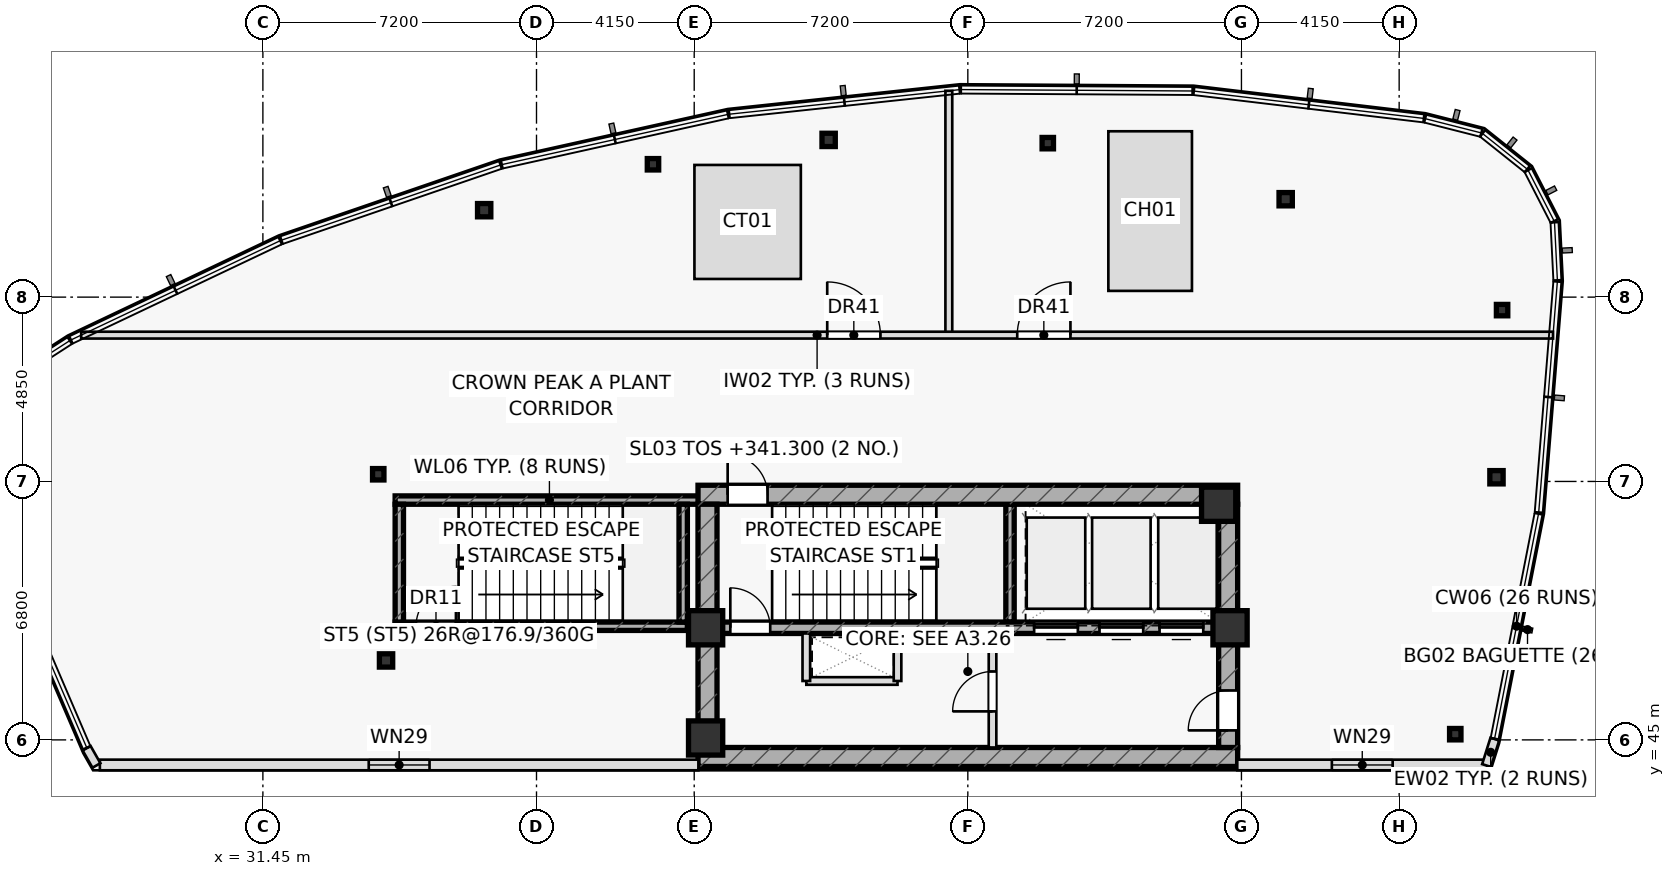
"""IFC4 building model, lengths in metres.
Left out: names, types, materials, properties, quantities, classifications, styles, units other than length and angle.
Written with IfcOpenShell. Run it as: python <this file> out.ifc"""

import sys

from ifc_helpers import new_model, si_unit, direction, frame, frame_2d, origin, origin_2d, place, context, subcontext, project, spatial, rectangle, hollow_rectangle, extrude, element, fill, save


model = new_model("IFC4")
c1 = context("Model", 3, precision=1e-05, world=origin(), true_north=direction((0.0, 1.0)))
c2 = subcontext(c1, "Body", "Model", "MODEL_VIEW")
j1 = project(units=[si_unit("LENGTHUNIT", "METRE"), si_unit("PLANEANGLEUNIT", "RADIAN")], contexts=[c1])
p1 = place(None, origin())
s1 = spatial("IfcSite", under=j1, at=p1, CompositionType="ELEMENT")
p2 = place(p1, origin())
s2 = spatial("IfcBuilding", under=s1, at=p2, CompositionType="ELEMENT")
p3 = place(p2, frame((0.0, 0.0, 341.3)))
s3 = spatial("IfcBuildingStorey", under=s2, at=p3, CompositionType="ELEMENT", Elevation=341.3)
p4 = place(p3, frame((51.11, 48.1, 0.0), z_axis=(0.0, 0.0, 1.0), x_axis=(0.0, 1.0, 0.0)))
e1 = element("IfcWall", 1, at=p4, inside=s3, PredefinedType="SHEAR", context=c2, shape_type="SweptSolid", body=[
    extrude(rectangle(XDim=3.1, YDim=0.22, at=frame_2d((1.55, 0.0))), origin(), (0.0, 0.0, 1.0), 4.25),
])
p5 = place(p3, frame((34.93, 47.99, 0.0), z_axis=(0.0, 0.0, 1.0), x_axis=(1.0, 0.0, 0.0)))
e2 = element("IfcWall", 2, at=p5, inside=s3, PredefinedType="SHEAR", context=c2, shape_type="SweptSolid", body=[
    extrude(rectangle(XDim=7.69, YDim=0.22, at=frame_2d((3.845, 0.0))), origin(), (0.0, 0.0, 1.0), 4.25),
])
p6 = place(p5, frame((0.55, 0.0, 0.0)))
e3 = element("IfcOpeningElement", 3, at=p6, cuts=e2, PredefinedType="OPENING", context=c2, shape_type="SweptSolid", body=[
    extrude(rectangle(XDim=1.05, YDim=2.2, at=frame_2d((0.525, 1.1))), frame((0.0, 0.12, 0.0), z_axis=(0.0, -1.0, 0.0), x_axis=(1.0, 0.0, 0.0)), (0.0, 0.0, 1.0), 0.24),
])
p7 = place(p3, frame((34.93, 51.31, 0.0), z_axis=(0.0, 0.0, 1.0), x_axis=(1.0, 0.0, 0.0)))
e4 = element("IfcWall", 4, at=p7, inside=s3, PredefinedType="SHEAR", context=c2, shape_type="SweptSolid", body=[
    extrude(rectangle(XDim=8.12, YDim=0.22, at=frame_2d((4.06, 0.0))), origin(), (0.0, 0.0, 1.0), 4.25),
])
for number, where, z_axis, x_axis in (
    (5, (42.51, 48.1, 0.0), (0.0, 0.0, 1.0), (0.0, 1.0, 0.0)),
    (6, (35.04, 48.1, 0.0), (0.0, 0.0, 1.0), (0.0, 1.0, 0.0)),
):
    element("IfcWall", number, at=place(p3, frame(where, z_axis=z_axis, x_axis=x_axis)), inside=s3, PredefinedType="SHEAR", context=c2, shape_type="SweptSolid", body=[
        extrude(rectangle(XDim=3.1, YDim=0.22, at=frame_2d((1.55, 0.0))), origin(), (0.0, 0.0, 1.0), 4.25),
    ])
p8 = place(p3, frame((42.9, 51.45, 0.0), z_axis=(0.0, 0.0, 1.0), x_axis=(1.0, 0.0, 0.0)))
e7 = element("IfcWall", 7, at=p8, inside=s3, PredefinedType="SHEAR", context=c2, shape_type="SweptSolid", body=[
    extrude(rectangle(XDim=14.2, YDim=0.5, at=frame_2d((7.1, 0.0))), origin(), (0.0, 0.0, 1.0), 4.25),
])
p9 = place(p8, frame((0.78, 0.0, 0.0)))
e8 = element("IfcOpeningElement", 8, at=p9, cuts=e7, PredefinedType="OPENING", context=c2, shape_type="SweptSolid", body=[
    extrude(rectangle(XDim=1.05, YDim=2.2, at=frame_2d((0.525, 1.1))), frame((0.0, 0.26, 0.0), z_axis=(0.0, -1.0, 0.0), x_axis=(1.0, 0.0, 0.0)), (0.0, 0.0, 1.0), 0.52),
])
p10 = place(p3, frame((42.9, 44.55, 0.0), z_axis=(0.0, 0.0, 1.0), x_axis=(1.0, 0.0, 0.0)))
e9 = element("IfcWall", 9, at=p10, inside=s3, PredefinedType="SHEAR", context=c2, shape_type="SweptSolid", body=[
    extrude(rectangle(XDim=14.2, YDim=0.5, at=frame_2d((7.1, 0.0))), origin(), (0.0, 0.0, 1.0), 4.25),
])
p11 = place(p3, frame((43.15, 44.8, 0.0), z_axis=(0.0, 0.0, 1.0), x_axis=(0.0, 1.0, 0.0)))
e10 = element("IfcWall", 10, at=p11, inside=s3, PredefinedType="SHEAR", context=c2, shape_type="SweptSolid", body=[
    extrude(rectangle(XDim=6.4, YDim=0.5, at=frame_2d((3.2, 0.0))), origin(), (0.0, 0.0, 1.0), 4.25),
])
p12 = place(p3, frame((56.85, 44.8, 0.0), z_axis=(0.0, 0.0, 1.0), x_axis=(0.0, 1.0, 0.0)))
e11 = element("IfcWall", 11, at=p12, inside=s3, PredefinedType="SHEAR", context=c2, shape_type="SweptSolid", body=[
    extrude(rectangle(XDim=6.4, YDim=0.5, at=frame_2d((3.2, 0.0))), origin(), (0.0, 0.0, 1.0), 4.25),
])
p13 = place(p12, frame((0.45, 0.0, 0.0)))
e12 = element("IfcOpeningElement", 12, at=p13, cuts=e11, PredefinedType="OPENING", context=c2, shape_type="SweptSolid", body=[
    extrude(rectangle(XDim=1.05, YDim=2.2, at=frame_2d((0.525, 1.1))), frame((0.0, 0.26, 0.0), z_axis=(0.0, -1.0, 0.0), x_axis=(1.0, 0.0, 0.0)), (0.0, 0.0, 1.0), 0.52),
])
p14 = place(p3, frame((43.4, 47.95, 0.0), z_axis=(0.0, 0.0, 1.0), x_axis=(1.0, 0.0, 0.0)))
e13 = element("IfcWall", 13, at=p14, inside=s3, PredefinedType="SHEAR", context=c2, shape_type="SweptSolid", body=[
    extrude(rectangle(XDim=13.2, YDim=0.3, at=frame_2d((6.6, 0.0))), origin(), (0.0, 0.0, 1.0), 4.25),
])
p15 = place(p14, frame((0.35, 0.0, 0.0)))
e14 = element("IfcOpeningElement", 14, at=p15, cuts=e13, PredefinedType="OPENING", context=c2, shape_type="SweptSolid", body=[
    extrude(rectangle(XDim=1.05, YDim=2.2, at=frame_2d((0.525, 1.1))), frame((0.0, 0.16, 0.0), z_axis=(0.0, -1.0, 0.0), x_axis=(1.0, 0.0, 0.0)), (0.0, 0.0, 1.0), 0.32),
])
p16 = place(p14, frame((8.345, 0.0, 0.0)))
e15 = element("IfcOpeningElement", 15, at=p16, cuts=e13, PredefinedType="OPENING", context=c2, shape_type="SweptSolid", body=[
    extrude(rectangle(XDim=1.15, YDim=2.2, at=frame_2d((0.575, 1.1))), frame((0.0, 0.16, 0.0), z_axis=(0.0, -1.0, 0.0), x_axis=(1.0, 0.0, 0.0)), (0.0, 0.0, 1.0), 0.32),
])
p17 = place(p14, frame((10.065, 0.0, 0.0)))
e16 = element("IfcOpeningElement", 16, at=p17, cuts=e13, PredefinedType="OPENING", context=c2, shape_type="SweptSolid", body=[
    extrude(rectangle(XDim=1.15, YDim=2.2, at=frame_2d((0.575, 1.1))), frame((0.0, 0.16, 0.0), z_axis=(0.0, -1.0, 0.0), x_axis=(1.0, 0.0, 0.0)), (0.0, 0.0, 1.0), 0.32),
])
p18 = place(p14, frame((11.645, 0.0, 0.0)))
e17 = element("IfcOpeningElement", 17, at=p18, cuts=e13, PredefinedType="OPENING", context=c2, shape_type="SweptSolid", body=[
    extrude(rectangle(XDim=1.15, YDim=2.2, at=frame_2d((0.575, 1.1))), frame((0.0, 0.16, 0.0), z_axis=(0.0, -1.0, 0.0), x_axis=(1.0, 0.0, 0.0)), (0.0, 0.0, 1.0), 0.32),
])
for number, where, z_axis, x_axis in (
    (18, (43.1, 47.95, 0.0), (0.0, 0.0, 1.0), (1.0, 0.0, 0.0)),
    (19, (56.9, 47.95, 0.0), (0.0, 0.0, 1.0), (1.0, 0.0, 0.0)),
    (20, (56.6, 51.2, 0.0), (0.0, 0.0, 1.0), (1.0, 0.0, 0.0)),
    (21, (43.1, 45.05, 0.0), (0.0, 0.0, 1.0), (1.0, 0.0, 0.0)),
):
    element("IfcColumn", number, at=place(p3, frame(where, z_axis=z_axis, x_axis=x_axis)), inside=s3, PredefinedType="COLUMN", context=c2, shape_type="SweptSolid", body=[
        extrude(rectangle(XDim=0.9, YDim=0.9, at=origin_2d()), origin(), (0.0, 0.0, 1.0), 4.25),
    ])
p19 = place(p3, frame((37.273, 58.938, 0.0), z_axis=(0.0, 0.0, 1.0), x_axis=(1.0, 0.0, 0.0)))
e22 = element("IfcColumn", 22, at=p19, inside=s3, PredefinedType="COLUMN", context=c2, shape_type="SweptSolid", body=[
    extrude(hollow_rectangle(XDim=0.35, YDim=0.35, WallThickness=0.02, at=origin_2d()), origin(), (0.0, 0.0, 1.0), 4.25),
])
p20 = place(p3, frame((34.485, 51.989, 0.0), z_axis=(0.0, 0.0, 1.0), x_axis=(1.0, 0.0, 0.0)))
e23 = element("IfcColumn", 23, at=p20, inside=s3, PredefinedType="COLUMN", context=c2, shape_type="SweptSolid", body=[
    extrude(hollow_rectangle(XDim=0.3, YDim=0.3, WallThickness=0.016, at=origin_2d()), origin(), (0.0, 0.0, 1.0), 4.25),
])
p21 = place(p3, frame((34.691, 47.09, 0.0), z_axis=(0.0, 0.0, 1.0), x_axis=(1.0, 0.0, 0.0)))
e24 = element("IfcColumn", 24, at=p21, inside=s3, PredefinedType="COLUMN", context=c2, shape_type="SweptSolid", body=[
    extrude(hollow_rectangle(XDim=0.35, YDim=0.35, WallThickness=0.02, at=origin_2d()), origin(), (0.0, 0.0, 1.0), 4.25),
])
p22 = place(p3, frame((62.826, 45.15, 0.0), z_axis=(0.0, 0.0, 1.0), x_axis=(1.0, 0.0, 0.0)))
e25 = element("IfcColumn", 25, at=p22, inside=s3, PredefinedType="COLUMN", context=c2, shape_type="SweptSolid", body=[
    extrude(hollow_rectangle(XDim=0.3, YDim=0.3, WallThickness=0.016, at=origin_2d()), origin(), (0.0, 0.0, 1.0), 4.25),
])
p23 = place(p3, frame((63.911, 51.911, 0.0), z_axis=(0.0, 0.0, 1.0), x_axis=(1.0, 0.0, 0.0)))
e26 = element("IfcColumn", 26, at=p23, inside=s3, PredefinedType="COLUMN", context=c2, shape_type="SweptSolid", body=[
    extrude(hollow_rectangle(XDim=0.35, YDim=0.35, WallThickness=0.02, at=origin_2d()), origin(), (0.0, 0.0, 1.0), 4.25),
])
p24 = place(p3, frame((64.058, 56.309, 0.0), z_axis=(0.0, 0.0, 1.0), x_axis=(1.0, 0.0, 0.0)))
e27 = element("IfcColumn", 27, at=p24, inside=s3, PredefinedType="COLUMN", context=c2, shape_type="SweptSolid", body=[
    extrude(hollow_rectangle(XDim=0.3, YDim=0.3, WallThickness=0.016, at=origin_2d()), origin(), (0.0, 0.0, 1.0), 4.25),
])
p25 = place(p3, frame((58.364, 59.226, 0.0), z_axis=(0.0, 0.0, 1.0), x_axis=(1.0, 0.0, 0.0)))
e28 = element("IfcColumn", 28, at=p25, inside=s3, PredefinedType="COLUMN", context=c2, shape_type="SweptSolid", body=[
    extrude(hollow_rectangle(XDim=0.35, YDim=0.35, WallThickness=0.02, at=origin_2d()), origin(), (0.0, 0.0, 1.0), 4.25),
])
p26 = place(p3, frame((52.104, 60.701, 0.0), z_axis=(0.0, 0.0, 1.0), x_axis=(1.0, 0.0, 0.0)))
e29 = element("IfcColumn", 29, at=p26, inside=s3, PredefinedType="COLUMN", context=c2, shape_type="SweptSolid", body=[
    extrude(hollow_rectangle(XDim=0.3, YDim=0.3, WallThickness=0.016, at=origin_2d()), origin(), (0.0, 0.0, 1.0), 4.25),
])
p27 = place(p3, frame((46.337, 60.787, 0.0), z_axis=(0.0, 0.0, 1.0), x_axis=(1.0, 0.0, 0.0)))
e30 = element("IfcColumn", 30, at=p27, inside=s3, PredefinedType="COLUMN", context=c2, shape_type="SweptSolid", body=[
    extrude(hollow_rectangle(XDim=0.35, YDim=0.35, WallThickness=0.02, at=origin_2d()), origin(), (0.0, 0.0, 1.0), 4.25),
])
p28 = place(p3, frame((41.715, 60.146, 0.0), z_axis=(0.0, 0.0, 1.0), x_axis=(1.0, 0.0, 0.0)))
e31 = element("IfcColumn", 31, at=p28, inside=s3, PredefinedType="COLUMN", context=c2, shape_type="SweptSolid", body=[
    extrude(hollow_rectangle(XDim=0.3, YDim=0.3, WallThickness=0.016, at=origin_2d()), origin(), (0.0, 0.0, 1.0), 4.25),
])
p29 = place(p3, frame((45.75, 46.55, 0.0), z_axis=(0.0, 0.0, 1.0), x_axis=(1.0, 0.0, 0.0)))
e32 = element("IfcWall", 32, at=p29, inside=s3, PredefinedType="PARTITIONING", context=c2, shape_type="SweptSolid", body=[
    extrude(rectangle(XDim=2.4, YDim=0.2, at=frame_2d((1.2, 0.0))), origin(), (0.0, 0.0, 1.0), 4.25),
])
for number, where, z_axis, x_axis in (
    (33, (48.15, 46.55, 0.0), (0.0, 0.0, 1.0), (0.0, 1.0, 0.0)),
    (34, (45.75, 46.55, 0.0), (0.0, 0.0, 1.0), (0.0, 1.0, 0.0)),
):
    element("IfcWall", number, at=place(p3, frame(where, z_axis=z_axis, x_axis=x_axis)), inside=s3, PredefinedType="PARTITIONING", context=c2, shape_type="SweptSolid", body=[
        extrude(rectangle(XDim=1.25, YDim=0.2, at=frame_2d((0.625, 0.0))), origin(), (0.0, 0.0, 1.0), 4.25),
    ])
p30 = place(p3, frame((50.65, 44.8, 0.0), z_axis=(0.0, 0.0, 1.0), x_axis=(0.0, 1.0, 0.0)))
e35 = element("IfcWall", 35, at=p30, inside=s3, PredefinedType="PARTITIONING", context=c2, shape_type="SweptSolid", body=[
    extrude(rectangle(XDim=3.0, YDim=0.2, at=frame_2d((1.5, 0.0))), origin(), (0.0, 0.0, 1.0), 4.25),
])
p31 = place(p30, frame((0.95, 0.0, 0.0)))
e36 = element("IfcOpeningElement", 36, at=p31, cuts=e35, PredefinedType="OPENING", context=c2, shape_type="SweptSolid", body=[
    extrude(rectangle(XDim=1.05, YDim=2.2, at=frame_2d((0.525, 1.1))), frame((0.0, 0.11, 0.0), z_axis=(0.0, -1.0, 0.0), x_axis=(1.0, 0.0, 0.0)), (0.0, 0.0, 1.0), 0.22),
])
p32 = place(p3, frame((49.5, 55.65, 0.0), z_axis=(0.0, 0.0, 1.0), x_axis=(0.0, 1.0, 0.0)))
e37 = element("IfcWall", 37, at=p32, inside=s3, PredefinedType="PARTITIONING", context=c2, shape_type="SweptSolid", body=[
    extrude(rectangle(XDim=6.429, YDim=0.18, at=frame_2d((3.215, 0.0))), origin(), (0.0, 0.0, 1.0), 4.25),
])
p33 = place(p3, frame((26.668, 55.65, 0.0), z_axis=(0.0, 0.0, 1.0), x_axis=(1.0, 0.0, 0.0)))
e38 = element("IfcWall", 38, at=p33, inside=s3, PredefinedType="PARTITIONING", context=c2, shape_type="SweptSolid", body=[
    extrude(rectangle(XDim=38.731, YDim=0.18, at=frame_2d((19.365, 0.0))), origin(), (0.0, 0.0, 1.0), 3.825),
])
p34 = place(p33, frame((19.632, 0.0, 0.0)))
e39 = element("IfcOpeningElement", 39, at=p34, cuts=e38, PredefinedType="OPENING", context=c2, shape_type="SweptSolid", body=[
    extrude(rectangle(XDim=1.4, YDim=2.15, at=frame_2d((0.7, 1.075))), frame((0.0, 0.1, 0.0), z_axis=(0.0, -1.0, 0.0), x_axis=(1.0, 0.0, 0.0)), (0.0, 0.0, 1.0), 0.2),
])
p35 = place(p33, frame((24.632, 0.0, 0.0)))
e40 = element("IfcOpeningElement", 40, at=p35, cuts=e38, PredefinedType="OPENING", context=c2, shape_type="SweptSolid", body=[
    extrude(rectangle(XDim=1.4, YDim=2.15, at=frame_2d((0.7, 1.075))), frame((0.0, 0.1, 0.0), z_axis=(0.0, -1.0, 0.0), x_axis=(1.0, 0.0, 0.0)), (0.0, 0.0, 1.0), 0.2),
])
p36 = place(p3, frame((27.16, 44.34, 0.0), z_axis=(0.0, 0.0, 1.0), x_axis=(1.0, 0.0, 0.0)))
e41 = element("IfcWall", 41, at=p36, inside=s3, PredefinedType="STANDARD", context=c2, shape_type="SweptSolid", body=[
    extrude(rectangle(XDim=15.75, YDim=0.28, at=frame_2d((7.875, 0.0))), origin(), (0.0, 0.0, 1.0), 4.25),
])
p37 = place(p36, frame((7.075, 0.0, 0.95)))
e42 = element("IfcOpeningElement", 42, at=p37, cuts=e41, PredefinedType="OPENING", context=c2, shape_type="SweptSolid", body=[
    extrude(rectangle(XDim=1.6, YDim=2.1, at=frame_2d((0.8, 1.05))), frame((0.0, 0.15, 0.0), z_axis=(0.0, -1.0, 0.0), x_axis=(1.0, 0.0, 0.0)), (0.0, 0.0, 1.0), 0.3),
])
p38 = place(p3, frame((57.09, 44.34, 0.0), z_axis=(0.0, 0.0, 1.0), x_axis=(1.0, 0.0, 0.0)))
e43 = element("IfcWall", 43, at=p38, inside=s3, PredefinedType="STANDARD", context=c2, shape_type="SweptSolid", body=[
    extrude(rectangle(XDim=6.578, YDim=0.28, at=frame_2d((3.289, 0.0))), origin(), (0.0, 0.0, 1.0), 4.25),
])
p39 = place(p38, frame((2.489, 0.0, 0.95)))
e44 = element("IfcOpeningElement", 44, at=p39, cuts=e43, PredefinedType="OPENING", context=c2, shape_type="SweptSolid", body=[
    extrude(rectangle(XDim=1.6, YDim=2.1, at=frame_2d((0.8, 1.05))), frame((0.0, 0.15, 0.0), z_axis=(0.0, -1.0, 0.0), x_axis=(1.0, 0.0, 0.0)), (0.0, 0.0, 1.0), 0.3),
])
p40 = place(p3, frame((63.649, 44.326, 0.0), z_axis=(0.0, 0.0, 1.0), x_axis=(0.300522684649, 0.953774667315, 0.0)))
e45 = element("IfcWall", 45, at=p40, inside=s3, PredefinedType="PARAPET", context=c2, shape_type="SweptSolid", body=[
    extrude(rectangle(XDim=0.729, YDim=0.24, at=frame_2d((0.365, 0.0))), origin(), (0.0, 0.0, 1.0), 4.25),
])
p41 = place(p3, frame((26.812, 44.781, 0.0), z_axis=(0.0, 0.0, 1.0), x_axis=(0.494980773686, -0.868903926612, 0.0)))
e46 = element("IfcWall", 46, at=p41, inside=s3, PredefinedType="PARAPET", context=c2, shape_type="SweptSolid", body=[
    extrude(rectangle(XDim=0.522, YDim=0.24, at=frame_2d((0.261, 0.0))), origin(), (0.0, 0.0, 1.0), 4.25),
])
p42 = place(p9, origin())
e47 = element("IfcDoor", 47, at=p42, inside=s3, OperationType="SINGLE_SWING_LEFT", PredefinedType="DOOR", context=c2, shape_type="SweptSolid", body=[
    extrude(rectangle(XDim=1.05, YDim=2.2, at=frame_2d((0.525, 1.1))), frame((0.0, 0.025, 0.0), z_axis=(0.0, -1.0, 0.0), x_axis=(1.0, 0.0, 0.0)), (0.0, 0.0, 1.0), 0.05),
])
fill(e8, e47)
p43 = place(p15, origin())
e48 = element("IfcDoor", 48, at=p43, inside=s3, OperationType="SINGLE_SWING_LEFT", PredefinedType="DOOR", context=c2, shape_type="SweptSolid", body=[
    extrude(rectangle(XDim=1.05, YDim=2.2, at=frame_2d((0.525, 1.1))), frame((0.0, 0.025, 0.0), z_axis=(0.0, -1.0, 0.0), x_axis=(1.0, 0.0, 0.0)), (0.0, 0.0, 1.0), 0.05),
])
fill(e14, e48)
p44 = place(p13, origin())
e49 = element("IfcDoor", 49, at=p44, inside=s3, OperationType="SINGLE_SWING_LEFT", PredefinedType="DOOR", context=c2, shape_type="SweptSolid", body=[
    extrude(rectangle(XDim=1.05, YDim=2.2, at=frame_2d((0.525, 1.1))), frame((0.0, 0.025, 0.0), z_axis=(0.0, -1.0, 0.0), x_axis=(1.0, 0.0, 0.0)), (0.0, 0.0, 1.0), 0.05),
])
fill(e12, e49)
p45 = place(p31, origin())
e50 = element("IfcDoor", 50, at=p45, inside=s3, OperationType="SINGLE_SWING_LEFT", PredefinedType="DOOR", context=c2, shape_type="SweptSolid", body=[
    extrude(rectangle(XDim=1.05, YDim=2.2, at=frame_2d((0.525, 1.1))), frame((0.0, 0.025, 0.0), z_axis=(0.0, -1.0, 0.0), x_axis=(1.0, 0.0, 0.0)), (0.0, 0.0, 1.0), 0.05),
])
fill(e36, e50)
p46 = place(p6, origin())
e51 = element("IfcDoor", 51, at=p46, inside=s3, OperationType="SINGLE_SWING_RIGHT", PredefinedType="DOOR", context=c2, shape_type="SweptSolid", body=[
    extrude(rectangle(XDim=1.05, YDim=2.2, at=frame_2d((0.525, 1.1))), frame((0.0, 0.025, 0.0), z_axis=(0.0, -1.0, 0.0), x_axis=(1.0, 0.0, 0.0)), (0.0, 0.0, 1.0), 0.05),
])
fill(e3, e51)
p47 = place(p34, origin())
e52 = element("IfcDoor", 52, at=p47, inside=s3, OperationType="SINGLE_SWING_LEFT", PredefinedType="DOOR", context=c2, shape_type="SweptSolid", body=[
    extrude(rectangle(XDim=1.4, YDim=2.15, at=frame_2d((0.7, 1.075))), frame((0.0, 0.025, 0.0), z_axis=(0.0, -1.0, 0.0), x_axis=(1.0, 0.0, 0.0)), (0.0, 0.0, 1.0), 0.05),
])
fill(e39, e52)
p48 = place(p35, origin())
e53 = element("IfcDoor", 53, at=p48, inside=s3, OperationType="SINGLE_SWING_RIGHT", PredefinedType="DOOR", context=c2, shape_type="SweptSolid", body=[
    extrude(rectangle(XDim=1.4, YDim=2.15, at=frame_2d((0.7, 1.075))), frame((0.0, 0.025, 0.0), z_axis=(0.0, -1.0, 0.0), x_axis=(1.0, 0.0, 0.0)), (0.0, 0.0, 1.0), 0.05),
])
fill(e40, e53)
p49 = place(p37, origin())
e54 = element("IfcWindow", 54, at=p49, inside=s3, PartitioningType="SINGLE_PANEL", PredefinedType="WINDOW", context=c2, shape_type="SweptSolid", body=[
    extrude(rectangle(XDim=1.6, YDim=2.1, at=frame_2d((0.8, 1.05))), frame((0.0, 0.03, 0.0), z_axis=(0.0, -1.0, 0.0), x_axis=(1.0, 0.0, 0.0)), (0.0, 0.0, 1.0), 0.06),
])
fill(e42, e54)
p50 = place(p39, origin())
e55 = element("IfcWindow", 55, at=p50, inside=s3, PartitioningType="SINGLE_PANEL", PredefinedType="WINDOW", context=c2, shape_type="SweptSolid", body=[
    extrude(rectangle(XDim=1.6, YDim=2.1, at=frame_2d((0.8, 1.05))), frame((0.0, 0.03, 0.0), z_axis=(0.0, -1.0, 0.0), x_axis=(1.0, 0.0, 0.0)), (0.0, 0.0, 1.0), 0.06),
])
fill(e44, e55)
p51 = place(p16, origin())
e56 = element("IfcDoor", 56, at=p51, inside=s3, OperationType="SLIDING_TO_LEFT", PredefinedType="DOOR", context=c2, shape_type="SweptSolid", body=[
    extrude(rectangle(XDim=1.15, YDim=2.2, at=frame_2d((0.575, 1.1))), frame((0.0, 0.025, 0.0), z_axis=(0.0, -1.0, 0.0), x_axis=(1.0, 0.0, 0.0)), (0.0, 0.0, 1.0), 0.05),
])
fill(e15, e56)
p52 = place(p17, origin())
e57 = element("IfcDoor", 57, at=p52, inside=s3, OperationType="SLIDING_TO_LEFT", PredefinedType="DOOR", context=c2, shape_type="SweptSolid", body=[
    extrude(rectangle(XDim=1.15, YDim=2.2, at=frame_2d((0.575, 1.1))), frame((0.0, 0.025, 0.0), z_axis=(0.0, -1.0, 0.0), x_axis=(1.0, 0.0, 0.0)), (0.0, 0.0, 1.0), 0.05),
])
fill(e16, e57)
p53 = place(p18, origin())
e58 = element("IfcDoor", 58, at=p53, inside=s3, OperationType="SLIDING_TO_LEFT", PredefinedType="DOOR", context=c2, shape_type="SweptSolid", body=[
    extrude(rectangle(XDim=1.15, YDim=2.2, at=frame_2d((0.575, 1.1))), frame((0.0, 0.025, 0.0), z_axis=(0.0, -1.0, 0.0), x_axis=(1.0, 0.0, 0.0)), (0.0, 0.0, 1.0), 0.05),
])
fill(e17, e58)
save(model, sys.argv[1])
